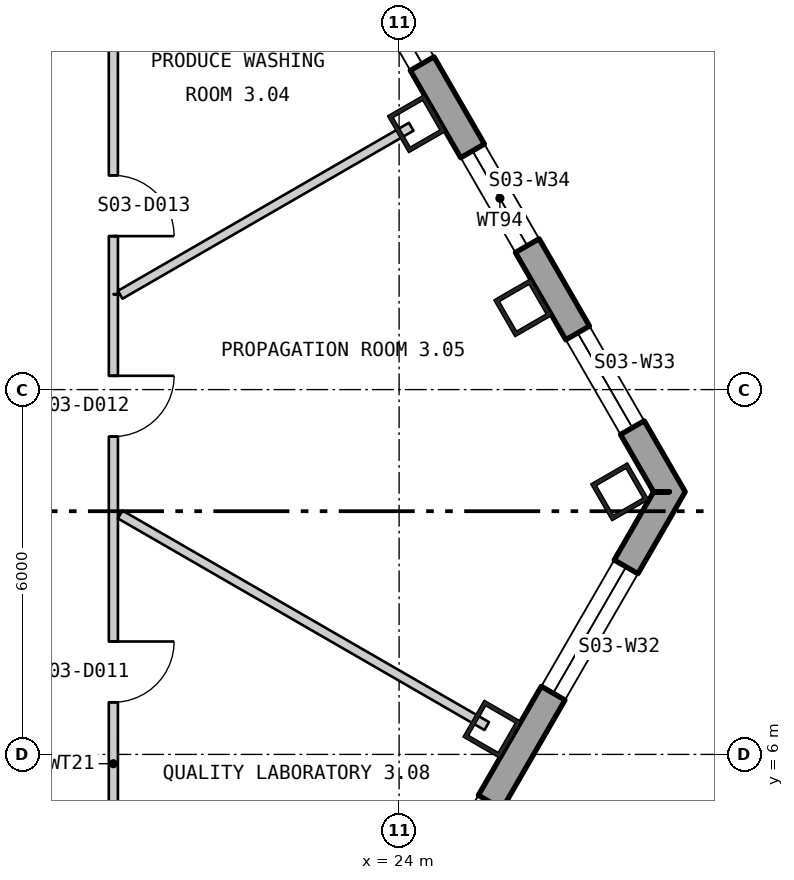
"""IFC4 building model, lengths in metres.
Left out: names, types, materials, properties, quantities, classifications, styles, units other than length and angle.
Written with IfcOpenShell. Run it as: python <this file> out.ifc"""

import sys

from ifc_helpers import new_model, si_unit, direction, frame, frame_2d, origin, origin_2d, place, context, subcontext, project, spatial, polyline, rectangle, hollow_rectangle, outline, extrude, element, fill, save


model = new_model("IFC4")
c1 = context("Model", 3, precision=1e-05, world=origin(), true_north=direction((0.0, 1.0)))
c2 = subcontext(c1, "Body", "Model", "MODEL_VIEW")
j1 = project(units=[si_unit("LENGTHUNIT", "METRE"), si_unit("PLANEANGLEUNIT", "RADIAN")], contexts=[c1])
p1 = place(None, origin())
s1 = spatial("IfcSite", under=j1, at=p1, CompositionType="ELEMENT")
p2 = place(p1, origin())
s2 = spatial("IfcBuilding", under=s1, at=p2, CompositionType="ELEMENT")
p3 = place(p2, frame((0.0, 0.0, 46.8)))
s3 = spatial("IfcBuildingStorey", under=s2, at=p3, CompositionType="ELEMENT", Elevation=46.8)
for number, where, z_axis, x_axis in (
    (1, (25.527, 6.415, 0.0), (0.0, 0.0, 1.0), (0.5, 0.866, 0.0)),
    (2, (27.628, 10.319, 0.0), (0.0, 0.0, 1.0), (-0.5, 0.866, 0.0)),
    (3, (26.034, 13.346, 0.0), (0.0, 0.0, 1.0), (-0.5, 0.866, 0.0)),
    (4, (24.286, 16.373, 0.0), (0.0, 0.0, 1.0), (-0.5, 0.866, 0.0)),
):
    element("IfcColumn", number, at=place(p3, frame(where, z_axis=z_axis, x_axis=x_axis)), inside=s3, PredefinedType="COLUMN", context=c2, shape_type="SweptSolid", body=[
        extrude(hollow_rectangle(XDim=0.7, YDim=0.7, WallThickness=0.07, at=origin_2d()), origin(), (0.0, 0.0, 1.0), 4.5),
    ])
p4 = place(p3, frame((5.575, -29.294, -0.18), z_axis=(0.0, 0.0, 1.0), x_axis=(0.499999764979, 0.866025539474, 0.0)))
e5 = element("IfcWall", 5, at=p4, inside=s3, PredefinedType="SOLIDWALL", context=c2, shape_type="SweptSolid", body=[
    extrude(outline(polyline([(-0.13, -0.225), (45.87, -0.225), (45.61, 0.225), (0.13, 0.225), (-0.13, -0.225)])), origin(), (0.0, 0.0, 1.0), 4.28),
])
p5 = place(p4, frame((1.424, 0.0, 1.08)))
e6 = element("IfcOpeningElement", 6, at=p5, cuts=e5, PredefinedType="OPENING", context=c2, shape_type="SweptSolid", body=[
    extrude(rectangle(XDim=2.4, YDim=2.6, at=frame_2d((1.2, 1.3))), frame((0.0, 0.235, 0.0), z_axis=(0.0, -1.0, 0.0), x_axis=(1.0, 0.0, 0.0)), (0.0, 0.0, 1.0), 0.47),
])
p6 = place(p4, frame((5.893, 0.0, 1.08)))
e7 = element("IfcOpeningElement", 7, at=p6, cuts=e5, PredefinedType="OPENING", context=c2, shape_type="SweptSolid", body=[
    extrude(rectangle(XDim=2.4, YDim=2.6, at=frame_2d((1.2, 1.3))), frame((0.0, 0.235, 0.0), z_axis=(0.0, -1.0, 0.0), x_axis=(1.0, 0.0, 0.0)), (0.0, 0.0, 1.0), 0.47),
])
p7 = place(p4, frame((10.401, 0.0, 1.08)))
e8 = element("IfcOpeningElement", 8, at=p7, cuts=e5, PredefinedType="OPENING", context=c2, shape_type="SweptSolid", body=[
    extrude(rectangle(XDim=2.4, YDim=2.6, at=frame_2d((1.2, 1.3))), frame((0.0, 0.235, 0.0), z_axis=(0.0, -1.0, 0.0), x_axis=(1.0, 0.0, 0.0)), (0.0, 0.0, 1.0), 0.47),
])
p8 = place(p4, frame((14.909, 0.0, 1.08)))
e9 = element("IfcOpeningElement", 9, at=p8, cuts=e5, PredefinedType="OPENING", context=c2, shape_type="SweptSolid", body=[
    extrude(rectangle(XDim=2.4, YDim=2.6, at=frame_2d((1.2, 1.3))), frame((0.0, 0.235, 0.0), z_axis=(0.0, -1.0, 0.0), x_axis=(1.0, 0.0, 0.0)), (0.0, 0.0, 1.0), 0.47),
])
p9 = place(p4, frame((19.416, 0.0, 1.08)))
e10 = element("IfcOpeningElement", 10, at=p9, cuts=e5, PredefinedType="OPENING", context=c2, shape_type="SweptSolid", body=[
    extrude(rectangle(XDim=2.4, YDim=2.6, at=frame_2d((1.2, 1.3))), frame((0.0, 0.235, 0.0), z_axis=(0.0, -1.0, 0.0), x_axis=(1.0, 0.0, 0.0)), (0.0, 0.0, 1.0), 0.47),
])
p10 = place(p4, frame((23.924, 0.0, 1.08)))
e11 = element("IfcOpeningElement", 11, at=p10, cuts=e5, PredefinedType="OPENING", context=c2, shape_type="SweptSolid", body=[
    extrude(rectangle(XDim=2.4, YDim=2.6, at=frame_2d((1.2, 1.3))), frame((0.0, 0.235, 0.0), z_axis=(0.0, -1.0, 0.0), x_axis=(1.0, 0.0, 0.0)), (0.0, 0.0, 1.0), 0.47),
])
p11 = place(p4, frame((37.447, 0.0, 1.08)))
e12 = element("IfcOpeningElement", 12, at=p11, cuts=e5, PredefinedType="OPENING", context=c2, shape_type="SweptSolid", body=[
    extrude(rectangle(XDim=2.4, YDim=2.6, at=frame_2d((1.2, 1.3))), frame((0.0, 0.235, 0.0), z_axis=(0.0, -1.0, 0.0), x_axis=(1.0, 0.0, 0.0)), (0.0, 0.0, 1.0), 0.47),
])
p12 = place(p4, frame((41.916, 0.0, 1.08)))
e13 = element("IfcOpeningElement", 13, at=p12, cuts=e5, PredefinedType="OPENING", context=c2, shape_type="SweptSolid", body=[
    extrude(rectangle(XDim=2.4, YDim=2.6, at=frame_2d((1.2, 1.3))), frame((0.0, 0.235, 0.0), z_axis=(0.0, -1.0, 0.0), x_axis=(1.0, 0.0, 0.0)), (0.0, 0.0, 1.0), 0.47),
])
p13 = place(p3, frame((28.445, 10.319, -0.4), z_axis=(0.0, 0.0, 1.0), x_axis=(-0.500002192499, 0.866024137941, 0.0)))
e14 = element("IfcWall", 14, at=p13, inside=s3, PredefinedType="SOLIDWALL", context=c2, shape_type="SweptSolid", body=[
    extrude(outline(polyline([(-0.13, -0.225), (11.28, -0.225), (11.02, 0.225), (0.13, 0.225), (-0.13, -0.225)])), origin(), (0.0, 0.0, 1.0), 4.5),
])
p14 = place(p13, frame((1.218, 0.0, 1.3)))
e15 = element("IfcOpeningElement", 15, at=p14, cuts=e14, PredefinedType="OPENING", context=c2, shape_type="SweptSolid", body=[
    extrude(rectangle(XDim=1.8, YDim=2.6, at=frame_2d((0.9, 1.3))), frame((0.0, 0.235, 0.0), z_axis=(0.0, -1.0, 0.0), x_axis=(1.0, 0.0, 0.0)), (0.0, 0.0, 1.0), 0.47),
])
p15 = place(p13, frame((4.675, 0.0, 1.3)))
e16 = element("IfcOpeningElement", 16, at=p15, cuts=e14, PredefinedType="OPENING", context=c2, shape_type="SweptSolid", body=[
    extrude(rectangle(XDim=1.8, YDim=2.6, at=frame_2d((0.9, 1.3))), frame((0.0, 0.235, 0.0), z_axis=(0.0, -1.0, 0.0), x_axis=(1.0, 0.0, 0.0)), (0.0, 0.0, 1.0), 0.47),
])
p16 = place(p13, frame((8.132, 0.0, 1.3)))
e17 = element("IfcOpeningElement", 17, at=p16, cuts=e14, PredefinedType="OPENING", context=c2, shape_type="SweptSolid", body=[
    extrude(rectangle(XDim=1.8, YDim=2.6, at=frame_2d((0.9, 1.3))), frame((0.0, 0.235, 0.0), z_axis=(0.0, -1.0, 0.0), x_axis=(1.0, 0.0, 0.0)), (0.0, 0.0, 1.0), 0.47),
])
p17 = place(p3, frame((19.3, -1.875, 0.0), z_axis=(0.0, 0.0, 1.0), x_axis=(6.4750065e-05, 0.999999997904, 0.0)))
e18 = element("IfcWall", 18, at=p17, inside=s3, PredefinedType="PARTITIONING", context=c2, shape_type="SweptSolid", body=[
    extrude(rectangle(XDim=15.444, YDim=0.15, at=frame_2d((7.722, 0.0))), origin(), (0.0, 0.0, 1.0), 4.3),
])
p18 = place(p17, frame((2.242, 0.0, 0.0)))
e19 = element("IfcOpeningElement", 19, at=p18, cuts=e18, PredefinedType="OPENING", context=c2, shape_type="SweptSolid", body=[
    extrude(rectangle(XDim=1.0, YDim=2.1, at=frame_2d((0.5, 1.05))), frame((0.0, 0.085, 0.0), z_axis=(0.0, -1.0, 0.0), x_axis=(1.0, 0.0, 0.0)), (0.0, 0.0, 1.0), 0.17),
])
p19 = place(p17, frame((4.664, 0.0, 0.0)))
e20 = element("IfcOpeningElement", 20, at=p19, cuts=e18, PredefinedType="OPENING", context=c2, shape_type="SweptSolid", body=[
    extrude(rectangle(XDim=1.0, YDim=2.1, at=frame_2d((0.5, 1.05))), frame((0.0, 0.085, 0.0), z_axis=(0.0, -1.0, 0.0), x_axis=(1.0, 0.0, 0.0)), (0.0, 0.0, 1.0), 0.17),
])
p20 = place(p17, frame((8.732, 0.0, 0.0)))
e21 = element("IfcOpeningElement", 21, at=p20, cuts=e18, PredefinedType="OPENING", context=c2, shape_type="SweptSolid", body=[
    extrude(rectangle(XDim=1.0, YDim=2.1, at=frame_2d((0.5, 1.05))), frame((0.0, 0.085, 0.0), z_axis=(0.0, -1.0, 0.0), x_axis=(1.0, 0.0, 0.0)), (0.0, 0.0, 1.0), 0.17),
])
p21 = place(p17, frame((13.102, 0.0, 0.0)))
e22 = element("IfcOpeningElement", 22, at=p21, cuts=e18, PredefinedType="OPENING", context=c2, shape_type="SweptSolid", body=[
    extrude(rectangle(XDim=1.0, YDim=2.1, at=frame_2d((0.5, 1.05))), frame((0.0, 0.085, 0.0), z_axis=(0.0, -1.0, 0.0), x_axis=(1.0, 0.0, 0.0)), (0.0, 0.0, 1.0), 0.17),
])
p22 = place(p3, frame((19.3, 19.749, 0.0), z_axis=(0.0, 0.0, 1.0), x_axis=(0.000161812296, -0.999999986908, 0.0)))
e23 = element("IfcWall", 23, at=p22, inside=s3, PredefinedType="PARTITIONING", context=c2, shape_type="SweptSolid", body=[
    extrude(rectangle(XDim=6.18, YDim=0.15, at=frame_2d((3.09, 0.0))), origin(), (0.0, 0.0, 1.0), 4.3),
])
p23 = place(p22, frame((4.225, 0.0, 0.0)))
e24 = element("IfcOpeningElement", 24, at=p23, cuts=e23, PredefinedType="OPENING", context=c2, shape_type="SweptSolid", body=[
    extrude(rectangle(XDim=1.0, YDim=2.1, at=frame_2d((0.5, 1.05))), frame((0.0, 0.085, 0.0), z_axis=(0.0, -1.0, 0.0), x_axis=(1.0, 0.0, 0.0)), (0.0, 0.0, 1.0), 0.17),
])
p24 = place(p3, frame((19.413, 9.946, 0.0), z_axis=(0.0, 0.0, 1.0), x_axis=(0.866042039906, -0.499971184285, 0.0)))
e25 = element("IfcWall", 25, at=p24, inside=s3, PredefinedType="PARTITIONING", context=c2, shape_type="SweptSolid", body=[
    extrude(rectangle(XDim=6.96, YDim=0.15, at=frame_2d((3.48, 0.0))), origin(), (0.0, 0.0, 1.0), 4.3),
])
p25 = place(p3, frame((19.413, 13.56, 0.0), z_axis=(0.0, 0.0, 1.0), x_axis=(0.866040948072, 0.499973075538, 0.0)))
e26 = element("IfcWall", 26, at=p25, inside=s3, PredefinedType="PARTITIONING", context=c2, shape_type="SweptSolid", body=[
    extrude(rectangle(XDim=5.526, YDim=0.15, at=frame_2d((2.763, 0.0))), origin(), (0.0, 0.0, 1.0), 4.3),
])
p26 = place(p11, origin())
e27 = element("IfcWindow", 27, at=p26, inside=s3, PartitioningType="SINGLE_PANEL", PredefinedType="WINDOW", context=c2, shape_type="SweptSolid", body=[
    extrude(rectangle(XDim=2.4, YDim=2.6, at=frame_2d((1.2, 1.3))), frame((0.0, 0.105, 0.0), z_axis=(0.0, -1.0, 0.0), x_axis=(1.0, 0.0, 0.0)), (0.0, 0.0, 1.0), 0.06),
])
fill(e12, e27)
p27 = place(p12, origin())
e28 = element("IfcWindow", 28, at=p27, inside=s3, PartitioningType="SINGLE_PANEL", PredefinedType="WINDOW", context=c2, shape_type="SweptSolid", body=[
    extrude(rectangle(XDim=2.4, YDim=2.6, at=frame_2d((1.2, 1.3))), frame((0.0, 0.105, 0.0), z_axis=(0.0, -1.0, 0.0), x_axis=(1.0, 0.0, 0.0)), (0.0, 0.0, 1.0), 0.06),
])
fill(e13, e28)
p28 = place(p14, origin())
e29 = element("IfcWindow", 29, at=p28, inside=s3, PartitioningType="SINGLE_PANEL", PredefinedType="WINDOW", context=c2, shape_type="SweptSolid", body=[
    extrude(rectangle(XDim=1.8, YDim=2.6, at=frame_2d((0.9, 1.3))), frame((0.0, 0.105, 0.0), z_axis=(0.0, -1.0, 0.0), x_axis=(1.0, 0.0, 0.0)), (0.0, 0.0, 1.0), 0.06),
])
fill(e15, e29)
p29 = place(p15, origin())
e30 = element("IfcWindow", 30, at=p29, inside=s3, PartitioningType="SINGLE_PANEL", PredefinedType="WINDOW", context=c2, shape_type="SweptSolid", body=[
    extrude(rectangle(XDim=1.8, YDim=2.6, at=frame_2d((0.9, 1.3))), frame((0.0, 0.105, 0.0), z_axis=(0.0, -1.0, 0.0), x_axis=(1.0, 0.0, 0.0)), (0.0, 0.0, 1.0), 0.06),
])
fill(e16, e30)
p30 = place(p16, origin())
e31 = element("IfcWindow", 31, at=p30, inside=s3, PartitioningType="SINGLE_PANEL", PredefinedType="WINDOW", context=c2, shape_type="SweptSolid", body=[
    extrude(rectangle(XDim=1.8, YDim=2.6, at=frame_2d((0.9, 1.3))), frame((0.0, 0.105, 0.0), z_axis=(0.0, -1.0, 0.0), x_axis=(1.0, 0.0, 0.0)), (0.0, 0.0, 1.0), 0.06),
])
fill(e17, e31)
p31 = place(p20, origin())
e32 = element("IfcDoor", 32, at=p31, inside=s3, OperationType="SINGLE_SWING_RIGHT", PredefinedType="DOOR", context=c2, shape_type="SweptSolid", body=[
    extrude(rectangle(XDim=1.0, YDim=2.1, at=frame_2d((0.5, 1.05))), frame((0.0, 0.025, 0.0), z_axis=(0.0, -1.0, 0.0), x_axis=(1.0, 0.0, 0.0)), (0.0, 0.0, 1.0), 0.05),
])
fill(e21, e32)
p32 = place(p21, origin())
e33 = element("IfcDoor", 33, at=p32, inside=s3, OperationType="SINGLE_SWING_RIGHT", PredefinedType="DOOR", context=c2, shape_type="SweptSolid", body=[
    extrude(rectangle(XDim=1.0, YDim=2.1, at=frame_2d((0.5, 1.05))), frame((0.0, 0.025, 0.0), z_axis=(0.0, -1.0, 0.0), x_axis=(1.0, 0.0, 0.0)), (0.0, 0.0, 1.0), 0.05),
])
fill(e22, e33)
p33 = place(p23, origin())
e34 = element("IfcDoor", 34, at=p33, inside=s3, OperationType="SINGLE_SWING_LEFT", PredefinedType="DOOR", context=c2, shape_type="SweptSolid", body=[
    extrude(rectangle(XDim=1.0, YDim=2.1, at=frame_2d((0.5, 1.05))), frame((0.0, 0.025, 0.0), z_axis=(0.0, -1.0, 0.0), x_axis=(1.0, 0.0, 0.0)), (0.0, 0.0, 1.0), 0.05),
])
fill(e24, e34)
save(model, sys.argv[1])
